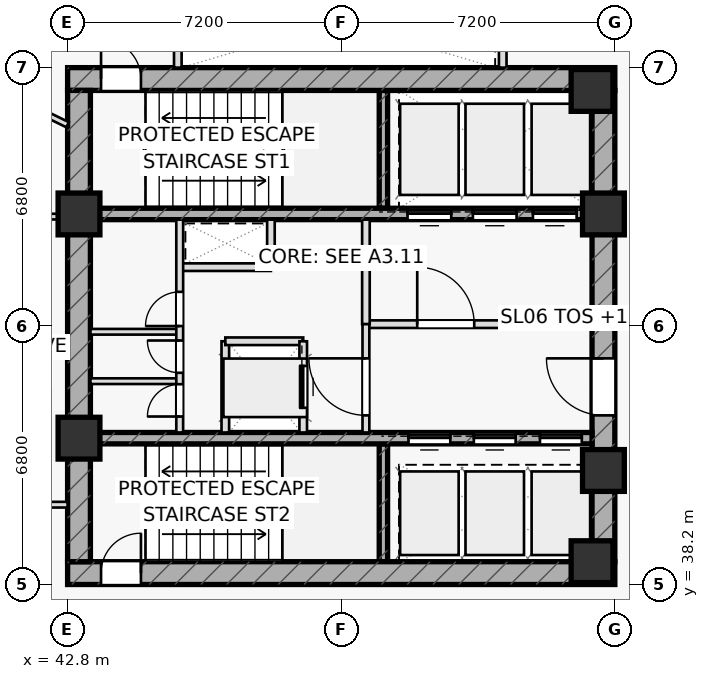
"""IFC4 building model, lengths in metres.
Left out: names, types, materials, properties, quantities, classifications, styles, units other than length and angle.
Written with IfcOpenShell. Run it as: python <this file> out.ifc"""

import sys

from ifc_helpers import new_model, si_unit, direction, frame, frame_2d, origin, origin_2d, place, context, subcontext, project, spatial, rectangle, extrude, element, fill, save


model = new_model("IFC4")
c1 = context("Model", 3, precision=1e-05, world=origin(), true_north=direction((0.0, 1.0)))
c2 = subcontext(c1, "Body", "Model", "MODEL_VIEW")
j1 = project(units=[si_unit("LENGTHUNIT", "METRE"), si_unit("PLANEANGLEUNIT", "RADIAN")], contexts=[c1])
p1 = place(None, origin())
s1 = spatial("IfcSite", under=j1, at=p1, CompositionType="ELEMENT")
p2 = place(p1, origin())
s2 = spatial("IfcBuilding", under=s1, at=p2, CompositionType="ELEMENT")
p3 = place(p2, frame((0.0, 0.0, 150.25)))
s3 = spatial("IfcBuildingStorey", under=s2, at=p3, CompositionType="ELEMENT", Elevation=150.25)
for number, where, z_axis, x_axis in (
    (1, (51.11, 48.1, 0.0), (0.0, 0.0, 1.0), (0.0, 1.0, 0.0)),
    (2, (51.11, 38.8, 0.0), (0.0, 0.0, 1.0), (0.0, 1.0, 0.0)),
):
    element("IfcWall", number, at=place(p3, frame(where, z_axis=z_axis, x_axis=x_axis)), inside=s3, PredefinedType="SHEAR", context=c2, shape_type="SweptSolid", body=[
        extrude(rectangle(XDim=3.1, YDim=0.22, at=frame_2d((1.55, 0.0))), origin(), (0.0, 0.0, 1.0), 3.55),
    ])
p4 = place(p3, frame((42.8, 51.5, 0.0), z_axis=(0.0, 0.0, 1.0), x_axis=(1.0, 0.0, 0.0)))
e3 = element("IfcWall", 3, at=p4, inside=s3, PredefinedType="SHEAR", context=c2, shape_type="SweptSolid", body=[
    extrude(rectangle(XDim=14.4, YDim=0.6, at=frame_2d((7.2, 0.0))), origin(), (0.0, 0.0, 1.0), 3.55),
])
p5 = place(p4, frame((0.88, 0.0, 0.0)))
e4 = element("IfcOpeningElement", 4, at=p5, cuts=e3, PredefinedType="OPENING", context=c2, shape_type="SweptSolid", body=[
    extrude(rectangle(XDim=1.05, YDim=2.2, at=frame_2d((0.525, 1.1))), frame((0.0, 0.31, 0.0), z_axis=(0.0, -1.0, 0.0), x_axis=(1.0, 0.0, 0.0)), (0.0, 0.0, 1.0), 0.62),
])
p6 = place(p3, frame((42.8, 38.5, 0.0), z_axis=(0.0, 0.0, 1.0), x_axis=(1.0, 0.0, 0.0)))
e5 = element("IfcWall", 5, at=p6, inside=s3, PredefinedType="SHEAR", context=c2, shape_type="SweptSolid", body=[
    extrude(rectangle(XDim=14.4, YDim=0.6, at=frame_2d((7.2, 0.0))), origin(), (0.0, 0.0, 1.0), 3.55),
])
p7 = place(p6, frame((0.88, 0.0, 0.0)))
e6 = element("IfcOpeningElement", 6, at=p7, cuts=e5, PredefinedType="OPENING", context=c2, shape_type="SweptSolid", body=[
    extrude(rectangle(XDim=1.05, YDim=2.2, at=frame_2d((0.525, 1.1))), frame((0.0, 0.31, 0.0), z_axis=(0.0, -1.0, 0.0), x_axis=(1.0, 0.0, 0.0)), (0.0, 0.0, 1.0), 0.62),
])
p8 = place(p3, frame((43.1, 38.8, 0.0), z_axis=(0.0, 0.0, 1.0), x_axis=(0.0, 1.0, 0.0)))
e7 = element("IfcWall", 7, at=p8, inside=s3, PredefinedType="SHEAR", context=c2, shape_type="SweptSolid", body=[
    extrude(rectangle(XDim=12.4, YDim=0.6, at=frame_2d((6.2, 0.0))), origin(), (0.0, 0.0, 1.0), 3.55),
])
p9 = place(p3, frame((56.9, 38.8, 0.0), z_axis=(0.0, 0.0, 1.0), x_axis=(0.0, 1.0, 0.0)))
e8 = element("IfcWall", 8, at=p9, inside=s3, PredefinedType="SHEAR", context=c2, shape_type="SweptSolid", body=[
    extrude(rectangle(XDim=12.4, YDim=0.6, at=frame_2d((6.2, 0.0))), origin(), (0.0, 0.0, 1.0), 3.55),
])
p10 = place(p9, frame((3.85, 0.0, 0.0)))
e9 = element("IfcOpeningElement", 9, at=p10, cuts=e8, PredefinedType="OPENING", context=c2, shape_type="SweptSolid", body=[
    extrude(rectangle(XDim=1.5, YDim=2.2, at=frame_2d((0.75, 1.1))), frame((0.0, 0.31, 0.0), z_axis=(0.0, -1.0, 0.0), x_axis=(1.0, 0.0, 0.0)), (0.0, 0.0, 1.0), 0.62),
])
p11 = place(p3, frame((43.4, 47.95, 0.0), z_axis=(0.0, 0.0, 1.0), x_axis=(1.0, 0.0, 0.0)))
e10 = element("IfcWall", 10, at=p11, inside=s3, PredefinedType="SHEAR", context=c2, shape_type="SweptSolid", body=[
    extrude(rectangle(XDim=13.2, YDim=0.3, at=frame_2d((6.6, 0.0))), origin(), (0.0, 0.0, 1.0), 3.55),
])
p12 = place(p11, frame((8.345, 0.0, 0.0)))
e11 = element("IfcOpeningElement", 11, at=p12, cuts=e10, PredefinedType="OPENING", context=c2, shape_type="SweptSolid", body=[
    extrude(rectangle(XDim=1.15, YDim=2.2, at=frame_2d((0.575, 1.1))), frame((0.0, 0.16, 0.0), z_axis=(0.0, -1.0, 0.0), x_axis=(1.0, 0.0, 0.0)), (0.0, 0.0, 1.0), 0.32),
])
p13 = place(p11, frame((10.065, 0.0, 0.0)))
e12 = element("IfcOpeningElement", 12, at=p13, cuts=e10, PredefinedType="OPENING", context=c2, shape_type="SweptSolid", body=[
    extrude(rectangle(XDim=1.15, YDim=2.2, at=frame_2d((0.575, 1.1))), frame((0.0, 0.16, 0.0), z_axis=(0.0, -1.0, 0.0), x_axis=(1.0, 0.0, 0.0)), (0.0, 0.0, 1.0), 0.32),
])
p14 = place(p11, frame((11.645, 0.0, 0.0)))
e13 = element("IfcOpeningElement", 13, at=p14, cuts=e10, PredefinedType="OPENING", context=c2, shape_type="SweptSolid", body=[
    extrude(rectangle(XDim=1.15, YDim=2.2, at=frame_2d((0.575, 1.1))), frame((0.0, 0.16, 0.0), z_axis=(0.0, -1.0, 0.0), x_axis=(1.0, 0.0, 0.0)), (0.0, 0.0, 1.0), 0.32),
])
p15 = place(p3, frame((43.4, 42.05, 0.0), z_axis=(0.0, 0.0, 1.0), x_axis=(1.0, 0.0, 0.0)))
e14 = element("IfcWall", 14, at=p15, inside=s3, PredefinedType="SHEAR", context=c2, shape_type="SweptSolid", body=[
    extrude(rectangle(XDim=13.2, YDim=0.3, at=frame_2d((6.6, 0.0))), origin(), (0.0, 0.0, 1.0), 3.55),
])
p16 = place(p15, frame((8.37, 0.0, 0.0)))
e15 = element("IfcOpeningElement", 15, at=p16, cuts=e14, PredefinedType="OPENING", context=c2, shape_type="SweptSolid", body=[
    extrude(rectangle(XDim=1.1, YDim=2.15, at=frame_2d((0.55, 1.075))), frame((0.0, 0.16, 0.0), z_axis=(0.0, -1.0, 0.0), x_axis=(1.0, 0.0, 0.0)), (0.0, 0.0, 1.0), 0.32),
])
p17 = place(p15, frame((10.09, 0.0, 0.0)))
e16 = element("IfcOpeningElement", 16, at=p17, cuts=e14, PredefinedType="OPENING", context=c2, shape_type="SweptSolid", body=[
    extrude(rectangle(XDim=1.1, YDim=2.15, at=frame_2d((0.55, 1.075))), frame((0.0, 0.16, 0.0), z_axis=(0.0, -1.0, 0.0), x_axis=(1.0, 0.0, 0.0)), (0.0, 0.0, 1.0), 0.32),
])
p18 = place(p15, frame((11.83, 0.0, 0.0)))
e17 = element("IfcOpeningElement", 17, at=p18, cuts=e14, PredefinedType="OPENING", context=c2, shape_type="SweptSolid", body=[
    extrude(rectangle(XDim=1.1, YDim=2.15, at=frame_2d((0.55, 1.075))), frame((0.0, 0.16, 0.0), z_axis=(0.0, -1.0, 0.0), x_axis=(1.0, 0.0, 0.0)), (0.0, 0.0, 1.0), 0.32),
])
for number, where, z_axis, x_axis in (
    (18, (43.1, 47.95, 0.0), (0.0, 0.0, 1.0), (1.0, 0.0, 0.0)),
    (19, (56.9, 47.95, 0.0), (0.0, 0.0, 1.0), (1.0, 0.0, 0.0)),
    (20, (56.6, 51.2, 0.0), (0.0, 0.0, 1.0), (1.0, 0.0, 0.0)),
    (21, (43.1, 42.05, 0.0), (0.0, 0.0, 1.0), (1.0, 0.0, 0.0)),
    (22, (56.9, 41.2, 0.0), (0.0, 0.0, 1.0), (1.0, 0.0, 0.0)),
    (23, (56.6, 38.8, 0.0), (0.0, 0.0, 1.0), (1.0, 0.0, 0.0)),
):
    element("IfcColumn", number, at=place(p3, frame(where, z_axis=z_axis, x_axis=x_axis)), inside=s3, PredefinedType="COLUMN", context=c2, shape_type="SweptSolid", body=[
        extrude(rectangle(XDim=1.1, YDim=1.1, at=origin_2d()), origin(), (0.0, 0.0, 1.0), 3.55),
    ])
for number, where, z_axis, x_axis in (
    (24, (45.7, 51.8, 0.0), (0.0, 0.0, 1.0), (0.0, 1.0, 0.0)),
    (25, (54.25, 51.8, 0.0), (0.0, 0.0, 1.0), (0.0, 1.0, 0.0)),
):
    element("IfcWall", number, at=place(p3, frame(where, z_axis=z_axis, x_axis=x_axis)), inside=s3, PredefinedType="PARTITIONING", context=c2, shape_type="SweptSolid", body=[
        extrude(rectangle(XDim=2.5, YDim=0.2, at=frame_2d((1.25, 0.0))), origin(), (0.0, 0.0, 1.0), 3.55),
    ])
p19 = place(p3, frame((45.75, 46.55, 0.0), z_axis=(0.0, 0.0, 1.0), x_axis=(1.0, 0.0, 0.0)))
e26 = element("IfcWall", 26, at=p19, inside=s3, PredefinedType="PARTITIONING", context=c2, shape_type="SweptSolid", body=[
    extrude(rectangle(XDim=2.4, YDim=0.2, at=frame_2d((1.2, 0.0))), origin(), (0.0, 0.0, 1.0), 3.55),
])
p20 = place(p3, frame((48.15, 46.55, 0.0), z_axis=(0.0, 0.0, 1.0), x_axis=(0.0, 1.0, 0.0)))
e27 = element("IfcWall", 27, at=p20, inside=s3, PredefinedType="PARTITIONING", context=c2, shape_type="SweptSolid", body=[
    extrude(rectangle(XDim=1.25, YDim=0.2, at=frame_2d((0.625, 0.0))), origin(), (0.0, 0.0, 1.0), 3.55),
])
p21 = place(p3, frame((46.95, 42.2, 0.0), z_axis=(0.0, 0.0, 1.0), x_axis=(0.0, 1.0, 0.0)))
e28 = element("IfcWall", 28, at=p21, inside=s3, PredefinedType="PARTITIONING", context=c2, shape_type="SweptSolid", body=[
    extrude(rectangle(XDim=2.4, YDim=0.2, at=frame_2d((1.2, 0.0))), origin(), (0.0, 0.0, 1.0), 3.55),
])
p22 = place(p3, frame((46.95, 44.6, 0.0), z_axis=(0.0, 0.0, 1.0), x_axis=(1.0, 0.0, 0.0)))
e29 = element("IfcWall", 29, at=p22, inside=s3, PredefinedType="PARTITIONING", context=c2, shape_type="SweptSolid", body=[
    extrude(rectangle(XDim=2.05, YDim=0.2, at=frame_2d((1.025, 0.0))), origin(), (0.0, 0.0, 1.0), 3.55),
])
p23 = place(p3, frame((50.65, 45.05, 0.0), z_axis=(0.0, 0.0, 1.0), x_axis=(1.0, 0.0, 0.0)))
e30 = element("IfcWall", 30, at=p23, inside=s3, PredefinedType="PARTITIONING", context=c2, shape_type="SweptSolid", body=[
    extrude(rectangle(XDim=5.95, YDim=0.2, at=frame_2d((2.975, 0.0))), origin(), (0.0, 0.0, 1.0), 3.55),
])
p24 = place(p23, frame((1.35, 0.0, 0.0)))
e31 = element("IfcOpeningElement", 31, at=p24, cuts=e30, PredefinedType="OPENING", context=c2, shape_type="SweptSolid", body=[
    extrude(rectangle(XDim=1.5, YDim=2.2, at=frame_2d((0.75, 1.1))), frame((0.0, 0.11, 0.0), z_axis=(0.0, -1.0, 0.0), x_axis=(1.0, 0.0, 0.0)), (0.0, 0.0, 1.0), 0.22),
])
p25 = place(p3, frame((50.65, 45.05, 0.0), z_axis=(0.0, 0.0, 1.0), x_axis=(0.0, 1.0, 0.0)))
e32 = element("IfcWall", 32, at=p25, inside=s3, PredefinedType="PARTITIONING", context=c2, shape_type="SweptSolid", body=[
    extrude(rectangle(XDim=2.75, YDim=0.2, at=frame_2d((1.375, 0.0))), origin(), (0.0, 0.0, 1.0), 3.55),
])
p26 = place(p3, frame((50.65, 42.2, 0.0), z_axis=(0.0, 0.0, 1.0), x_axis=(0.0, 1.0, 0.0)))
e33 = element("IfcWall", 33, at=p26, inside=s3, PredefinedType="PARTITIONING", context=c2, shape_type="SweptSolid", body=[
    extrude(rectangle(XDim=2.85, YDim=0.18, at=frame_2d((1.425, 0.0))), origin(), (0.0, 0.0, 1.0), 3.55),
])
p27 = place(p26, frame((0.45, 0.0, 0.0)))
e34 = element("IfcOpeningElement", 34, at=p27, cuts=e33, PredefinedType="OPENING", context=c2, shape_type="SweptSolid", body=[
    extrude(rectangle(XDim=1.5, YDim=2.2, at=frame_2d((0.75, 1.1))), frame((0.0, 0.1, 0.0), z_axis=(0.0, -1.0, 0.0), x_axis=(1.0, 0.0, 0.0)), (0.0, 0.0, 1.0), 0.2),
])
for number, where, z_axis, x_axis in (
    (35, (43.4, 43.55, 0.0), (0.0, 0.0, 1.0), (1.0, 0.0, 0.0)),
    (36, (43.4, 44.85, 0.0), (0.0, 0.0, 1.0), (1.0, 0.0, 0.0)),
):
    element("IfcWall", number, at=place(p3, frame(where, z_axis=z_axis, x_axis=x_axis)), inside=s3, PredefinedType="PARTITIONING", context=c2, shape_type="SweptSolid", body=[
        extrude(rectangle(XDim=2.35, YDim=0.15, at=frame_2d((1.175, 0.0))), origin(), (0.0, 0.0, 1.0), 3.55),
    ])
p28 = place(p3, frame((45.75, 42.2, 0.0), z_axis=(0.0, 0.0, 1.0), x_axis=(0.0, 1.0, 0.0)))
e37 = element("IfcWall", 37, at=p28, inside=s3, PredefinedType="PARTITIONING", context=c2, shape_type="SweptSolid", body=[
    extrude(rectangle(XDim=5.6, YDim=0.18, at=frame_2d((2.8, 0.0))), origin(), (0.0, 0.0, 1.0), 3.55),
])
p29 = place(p28, frame((0.42, 0.0, 0.0)))
e38 = element("IfcOpeningElement", 38, at=p29, cuts=e37, PredefinedType="OPENING", context=c2, shape_type="SweptSolid", body=[
    extrude(rectangle(XDim=0.85, YDim=2.05, at=frame_2d((0.425, 1.025))), frame((0.0, 0.1, 0.0), z_axis=(0.0, -1.0, 0.0), x_axis=(1.0, 0.0, 0.0)), (0.0, 0.0, 1.0), 0.2),
])
p30 = place(p28, frame((1.57, 0.0, 0.0)))
e39 = element("IfcOpeningElement", 39, at=p30, cuts=e37, PredefinedType="OPENING", context=c2, shape_type="SweptSolid", body=[
    extrude(rectangle(XDim=0.85, YDim=2.05, at=frame_2d((0.425, 1.025))), frame((0.0, 0.1, 0.0), z_axis=(0.0, -1.0, 0.0), x_axis=(1.0, 0.0, 0.0)), (0.0, 0.0, 1.0), 0.2),
])
p31 = place(p28, frame((2.8, 0.0, 0.0)))
e40 = element("IfcOpeningElement", 40, at=p31, cuts=e37, PredefinedType="OPENING", context=c2, shape_type="SweptSolid", body=[
    extrude(rectangle(XDim=0.9, YDim=2.05, at=frame_2d((0.45, 1.025))), frame((0.0, 0.1, 0.0), z_axis=(0.0, -1.0, 0.0), x_axis=(1.0, 0.0, 0.0)), (0.0, 0.0, 1.0), 0.2),
])
p32 = place(p3, frame((37.14, 40.3, 0.0), z_axis=(0.0, 0.0, 1.0), x_axis=(1.0, 0.0, 0.0)))
e41 = element("IfcWall", 41, at=p32, inside=s3, PredefinedType="PARTITIONING", context=c2, shape_type="SweptSolid", body=[
    extrude(rectangle(XDim=5.66, YDim=0.15, at=frame_2d((2.83, 0.0))), origin(), (0.0, 0.0, 1.0), 3.55),
])
p33 = place(p32, frame((3.21, 0.0, 0.0)))
e42 = element("IfcOpeningElement", 42, at=p33, cuts=e41, PredefinedType="OPENING", context=c2, shape_type="SweptSolid", body=[
    extrude(rectangle(XDim=0.95, YDim=2.05, at=frame_2d((0.475, 1.025))), frame((0.0, 0.085, 0.0), z_axis=(0.0, -1.0, 0.0), x_axis=(1.0, 0.0, 0.0)), (0.0, 0.0, 1.0), 0.17),
])
p34 = place(p3, frame((37.14, 47.88, 0.0), z_axis=(0.0, 0.0, 1.0), x_axis=(1.0, 0.0, 0.0)))
e43 = element("IfcWall", 43, at=p34, inside=s3, PredefinedType="PARTITIONING", context=c2, shape_type="SweptSolid", body=[
    extrude(rectangle(XDim=5.66, YDim=0.15, at=frame_2d((2.83, 0.0))), origin(), (0.0, 0.0, 1.0), 2.835),
])
p35 = place(p3, frame((42.8, 50.297, 0.0), z_axis=(0.0, 0.0, 1.0), x_axis=(-0.897818546691, 0.440365594951, 0.0)))
e44 = element("IfcWall", 44, at=p35, inside=s3, PredefinedType="PARTITIONING", context=c2, shape_type="SweptSolid", body=[
    extrude(rectangle(XDim=12.502, YDim=0.15, at=frame_2d((6.251, 0.0))), origin(), (0.0, 0.0, 1.0), 2.835),
])
p36 = place(p35, frame((1.35, 0.0, 0.0)))
e45 = element("IfcOpeningElement", 45, at=p36, cuts=e44, PredefinedType="OPENING", context=c2, shape_type="SweptSolid", body=[
    extrude(rectangle(XDim=0.95, YDim=2.05, at=frame_2d((0.475, 1.025))), frame((0.0, 0.085, 0.0), z_axis=(0.0, -1.0, 0.0), x_axis=(1.0, 0.0, 0.0)), (0.0, 0.0, 1.0), 0.17),
])
p37 = place(p3, frame((49.0, 42.2, 0.0), z_axis=(0.0, 0.0, 1.0), x_axis=(0.0, 1.0, 0.0)))
e46 = element("IfcWall", 46, at=p37, inside=s3, PredefinedType="PARTITIONING", context=c2, shape_type="SweptSolid", body=[
    extrude(rectangle(XDim=2.4, YDim=0.2, at=frame_2d((1.2, 0.0))), origin(), (0.0, 0.0, 1.0), 3.55),
])
p38 = place(p37, frame((0.65, 0.0, 0.0)))
e47 = element("IfcOpeningElement", 47, at=p38, cuts=e46, PredefinedType="OPENING", context=c2, shape_type="SweptSolid", body=[
    extrude(rectangle(XDim=1.1, YDim=2.15, at=frame_2d((0.55, 1.075))), frame((0.0, 0.11, 0.0), z_axis=(0.0, -1.0, 0.0), x_axis=(1.0, 0.0, 0.0)), (0.0, 0.0, 1.0), 0.22),
])
p39 = place(p5, origin())
e48 = element("IfcDoor", 48, at=p39, inside=s3, OperationType="SINGLE_SWING_LEFT", PredefinedType="DOOR", context=c2, shape_type="SweptSolid", body=[
    extrude(rectangle(XDim=1.05, YDim=2.2, at=frame_2d((0.525, 1.1))), frame((0.0, 0.025, 0.0), z_axis=(0.0, -1.0, 0.0), x_axis=(1.0, 0.0, 0.0)), (0.0, 0.0, 1.0), 0.05),
])
fill(e4, e48)
p40 = place(p7, origin())
e49 = element("IfcDoor", 49, at=p40, inside=s3, OperationType="SINGLE_SWING_RIGHT", PredefinedType="DOOR", context=c2, shape_type="SweptSolid", body=[
    extrude(rectangle(XDim=1.05, YDim=2.2, at=frame_2d((0.525, 1.1))), frame((0.0, 0.025, 0.0), z_axis=(0.0, -1.0, 0.0), x_axis=(1.0, 0.0, 0.0)), (0.0, 0.0, 1.0), 0.05),
])
fill(e6, e49)
p41 = place(p10, origin())
e50 = element("IfcDoor", 50, at=p41, inside=s3, OperationType="SINGLE_SWING_RIGHT", PredefinedType="DOOR", context=c2, shape_type="SweptSolid", body=[
    extrude(rectangle(XDim=1.5, YDim=2.2, at=frame_2d((0.75, 1.1))), frame((0.0, 0.025, 0.0), z_axis=(0.0, -1.0, 0.0), x_axis=(1.0, 0.0, 0.0)), (0.0, 0.0, 1.0), 0.05),
])
fill(e9, e50)
p42 = place(p24, origin())
e51 = element("IfcDoor", 51, at=p42, inside=s3, OperationType="SINGLE_SWING_LEFT", PredefinedType="DOOR", context=c2, shape_type="SweptSolid", body=[
    extrude(rectangle(XDim=1.5, YDim=2.2, at=frame_2d((0.75, 1.1))), frame((0.0, 0.025, 0.0), z_axis=(0.0, -1.0, 0.0), x_axis=(1.0, 0.0, 0.0)), (0.0, 0.0, 1.0), 0.05),
])
fill(e31, e51)
p43 = place(p27, origin())
e52 = element("IfcDoor", 52, at=p43, inside=s3, OperationType="SINGLE_SWING_RIGHT", PredefinedType="DOOR", context=c2, shape_type="SweptSolid", body=[
    extrude(rectangle(XDim=1.5, YDim=2.2, at=frame_2d((0.75, 1.1))), frame((0.0, 0.025, 0.0), z_axis=(0.0, -1.0, 0.0), x_axis=(1.0, 0.0, 0.0)), (0.0, 0.0, 1.0), 0.05),
])
fill(e34, e52)
p44 = place(p29, origin())
e53 = element("IfcDoor", 53, at=p44, inside=s3, OperationType="SINGLE_SWING_LEFT", PredefinedType="DOOR", context=c2, shape_type="SweptSolid", body=[
    extrude(rectangle(XDim=0.85, YDim=2.05, at=frame_2d((0.425, 1.025))), frame((0.0, 0.025, 0.0), z_axis=(0.0, -1.0, 0.0), x_axis=(1.0, 0.0, 0.0)), (0.0, 0.0, 1.0), 0.05),
])
fill(e38, e53)
p45 = place(p30, origin())
e54 = element("IfcDoor", 54, at=p45, inside=s3, OperationType="SINGLE_SWING_RIGHT", PredefinedType="DOOR", context=c2, shape_type="SweptSolid", body=[
    extrude(rectangle(XDim=0.85, YDim=2.05, at=frame_2d((0.425, 1.025))), frame((0.0, 0.025, 0.0), z_axis=(0.0, -1.0, 0.0), x_axis=(1.0, 0.0, 0.0)), (0.0, 0.0, 1.0), 0.05),
])
fill(e39, e54)
p46 = place(p31, origin())
e55 = element("IfcDoor", 55, at=p46, inside=s3, OperationType="SINGLE_SWING_LEFT", PredefinedType="DOOR", context=c2, shape_type="SweptSolid", body=[
    extrude(rectangle(XDim=0.9, YDim=2.05, at=frame_2d((0.45, 1.025))), frame((0.0, 0.025, 0.0), z_axis=(0.0, -1.0, 0.0), x_axis=(1.0, 0.0, 0.0)), (0.0, 0.0, 1.0), 0.05),
])
fill(e40, e55)
p47 = place(p12, origin())
e56 = element("IfcDoor", 56, at=p47, inside=s3, OperationType="SLIDING_TO_LEFT", PredefinedType="DOOR", context=c2, shape_type="SweptSolid", body=[
    extrude(rectangle(XDim=1.15, YDim=2.2, at=frame_2d((0.575, 1.1))), frame((0.0, 0.025, 0.0), z_axis=(0.0, -1.0, 0.0), x_axis=(1.0, 0.0, 0.0)), (0.0, 0.0, 1.0), 0.05),
])
fill(e11, e56)
p48 = place(p13, origin())
e57 = element("IfcDoor", 57, at=p48, inside=s3, OperationType="SLIDING_TO_LEFT", PredefinedType="DOOR", context=c2, shape_type="SweptSolid", body=[
    extrude(rectangle(XDim=1.15, YDim=2.2, at=frame_2d((0.575, 1.1))), frame((0.0, 0.025, 0.0), z_axis=(0.0, -1.0, 0.0), x_axis=(1.0, 0.0, 0.0)), (0.0, 0.0, 1.0), 0.05),
])
fill(e12, e57)
p49 = place(p14, origin())
e58 = element("IfcDoor", 58, at=p49, inside=s3, OperationType="SLIDING_TO_LEFT", PredefinedType="DOOR", context=c2, shape_type="SweptSolid", body=[
    extrude(rectangle(XDim=1.15, YDim=2.2, at=frame_2d((0.575, 1.1))), frame((0.0, 0.025, 0.0), z_axis=(0.0, -1.0, 0.0), x_axis=(1.0, 0.0, 0.0)), (0.0, 0.0, 1.0), 0.05),
])
fill(e13, e58)
p50 = place(p16, origin())
e59 = element("IfcDoor", 59, at=p50, inside=s3, OperationType="SLIDING_TO_LEFT", PredefinedType="DOOR", context=c2, shape_type="SweptSolid", body=[
    extrude(rectangle(XDim=1.1, YDim=2.15, at=frame_2d((0.55, 1.075))), frame((0.0, 0.025, 0.0), z_axis=(0.0, -1.0, 0.0), x_axis=(1.0, 0.0, 0.0)), (0.0, 0.0, 1.0), 0.05),
])
fill(e15, e59)
p51 = place(p17, origin())
e60 = element("IfcDoor", 60, at=p51, inside=s3, OperationType="SLIDING_TO_LEFT", PredefinedType="DOOR", context=c2, shape_type="SweptSolid", body=[
    extrude(rectangle(XDim=1.1, YDim=2.15, at=frame_2d((0.55, 1.075))), frame((0.0, 0.025, 0.0), z_axis=(0.0, -1.0, 0.0), x_axis=(1.0, 0.0, 0.0)), (0.0, 0.0, 1.0), 0.05),
])
fill(e16, e60)
p52 = place(p18, origin())
e61 = element("IfcDoor", 61, at=p52, inside=s3, OperationType="SLIDING_TO_LEFT", PredefinedType="DOOR", context=c2, shape_type="SweptSolid", body=[
    extrude(rectangle(XDim=1.1, YDim=2.15, at=frame_2d((0.55, 1.075))), frame((0.0, 0.025, 0.0), z_axis=(0.0, -1.0, 0.0), x_axis=(1.0, 0.0, 0.0)), (0.0, 0.0, 1.0), 0.05),
])
fill(e17, e61)
p53 = place(p38, origin())
e62 = element("IfcDoor", 62, at=p53, inside=s3, OperationType="SLIDING_TO_RIGHT", PredefinedType="DOOR", context=c2, shape_type="SweptSolid", body=[
    extrude(rectangle(XDim=1.1, YDim=2.15, at=frame_2d((0.55, 1.075))), frame((0.0, 0.025, 0.0), z_axis=(0.0, -1.0, 0.0), x_axis=(1.0, 0.0, 0.0)), (0.0, 0.0, 1.0), 0.05),
])
fill(e47, e62)
save(model, sys.argv[1])
